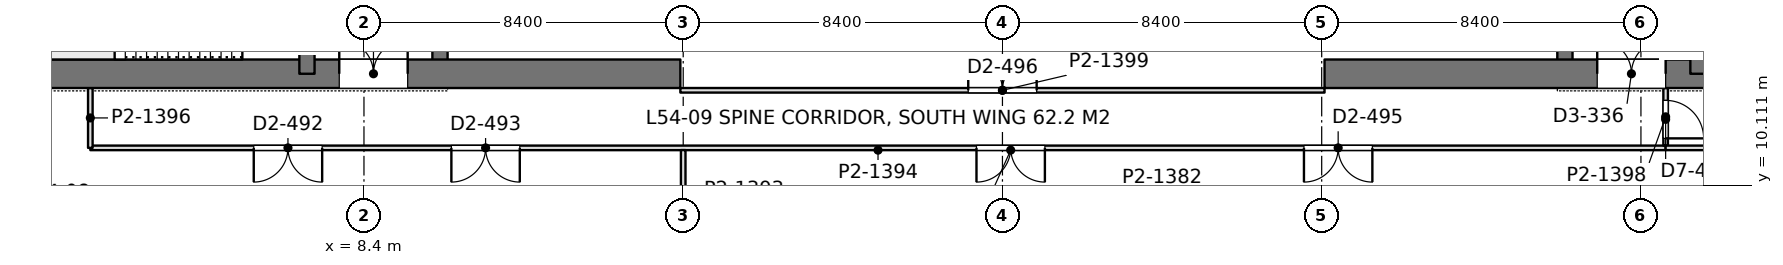
"""IFC4 building model, lengths in metres.
Left out: names, types, materials, properties, quantities, classifications, styles, units other than length and angle.
Written with IfcOpenShell. Run it as: python <this file> out.ifc"""

import sys

from ifc_helpers import new_model, si_unit, direction, frame, frame_2d, origin, place, context, subcontext, project, spatial, rectangle, extrude, element, fill, save


model = new_model("IFC4")
c1 = context("Model", 3, precision=1e-05, world=origin(), true_north=direction((0.0, 1.0)))
c2 = subcontext(c1, "Body", "Model", "MODEL_VIEW")
j1 = project(units=[si_unit("LENGTHUNIT", "METRE"), si_unit("PLANEANGLEUNIT", "RADIAN")], contexts=[c1])
p1 = place(None, origin())
s1 = spatial("IfcSite", under=j1, at=p1, CompositionType="ELEMENT")
p2 = place(p1, origin())
s2 = spatial("IfcBuilding", under=s1, at=p2, CompositionType="ELEMENT")
p3 = place(p2, frame((0.0, 0.0, 236.4)))
s3 = spatial("IfcBuildingStorey", under=s2, at=p3, CompositionType="ELEMENT", Elevation=236.4)
p4 = place(p3, frame((-1.125, 13.05, 0.0), z_axis=(0.0, 0.0, 1.0), x_axis=(1.0, 0.0, 0.0)))
e1 = element("IfcWall", 1, at=p4, inside=s3, PredefinedType="SHEAR", context=c2, shape_type="SweptSolid", body=[
    extrude(rectangle(XDim=17.85, YDim=0.75, at=frame_2d((8.925, 0.0))), origin(), (0.0, 0.0, 1.0), 4.2),
])
p5 = place(p4, frame((8.875, 0.0, 0.0)))
e2 = element("IfcOpeningElement", 2, at=p5, cuts=e1, PredefinedType="OPENING", context=c2, shape_type="SweptSolid", body=[
    extrude(rectangle(XDim=1.8, YDim=2.4, at=frame_2d((0.9, 1.2))), frame((0.0, 0.385, 0.0), z_axis=(0.0, -1.0, 0.0), x_axis=(1.0, 0.0, 0.0)), (0.0, 0.0, 1.0), 0.77),
])
p6 = place(p3, frame((6.9, 13.05, 0.0), z_axis=(0.0, 0.0, 1.0), x_axis=(0.0, 1.0, 0.0)))
e3 = element("IfcWall", 3, at=p6, inside=s3, PredefinedType="SHEAR", context=c2, shape_type="SweptSolid", body=[
    extrude(rectangle(XDim=24.3, YDim=0.4, at=frame_2d((12.15, 0.0))), origin(), (0.0, 0.0, 1.0), 4.2),
])
p7 = place(p6, frame((1.3, 0.0, 0.0)))
e4 = element("IfcOpeningElement", 4, at=p7, cuts=e3, PredefinedType="OPENING", context=c2, shape_type="SweptSolid", body=[
    extrude(rectangle(XDim=1.0, YDim=2.2, at=frame_2d((0.5, 1.1))), frame((0.0, 0.21, 0.0), z_axis=(0.0, -1.0, 0.0), x_axis=(1.0, 0.0, 0.0)), (0.0, 0.0, 1.0), 0.42),
])
p8 = place(p6, frame((22.0, 0.0, 0.0)))
e5 = element("IfcOpeningElement", 5, at=p8, cuts=e3, PredefinedType="OPENING", context=c2, shape_type="SweptSolid", body=[
    extrude(rectangle(XDim=1.0, YDim=2.2, at=frame_2d((0.5, 1.1))), frame((0.0, 0.21, 0.0), z_axis=(0.0, -1.0, 0.0), x_axis=(1.0, 0.0, 0.0)), (0.0, 0.0, 1.0), 0.42),
])
p9 = place(p6, frame((5.55, 0.0, 0.0)))
e6 = element("IfcOpeningElement", 6, at=p9, cuts=e3, PredefinedType="OPENING", context=c2, shape_type="SweptSolid", body=[
    extrude(rectangle(XDim=1.0, YDim=2.2, at=frame_2d((0.5, 1.1))), frame((0.0, 0.21, 0.0), z_axis=(0.0, -1.0, 0.0), x_axis=(1.0, 0.0, 0.0)), (0.0, 0.0, 1.0), 0.42),
])
p10 = place(p6, frame((9.55, 0.0, 0.0)))
e7 = element("IfcOpeningElement", 7, at=p10, cuts=e3, PredefinedType="OPENING", context=c2, shape_type="SweptSolid", body=[
    extrude(rectangle(XDim=1.0, YDim=2.2, at=frame_2d((0.5, 1.1))), frame((0.0, 0.21, 0.0), z_axis=(0.0, -1.0, 0.0), x_axis=(1.0, 0.0, 0.0)), (0.0, 0.0, 1.0), 0.42),
])
p11 = place(p6, frame((12.8, 0.0, 0.0)))
e8 = element("IfcOpeningElement", 8, at=p11, cuts=e3, PredefinedType="OPENING", context=c2, shape_type="SweptSolid", body=[
    extrude(rectangle(XDim=1.1, YDim=2.2, at=frame_2d((0.55, 1.1))), frame((0.0, 0.21, 0.0), z_axis=(0.0, -1.0, 0.0), x_axis=(1.0, 0.0, 0.0)), (0.0, 0.0, 1.0), 0.42),
])
p12 = place(p6, frame((15.538, 0.0, 0.0)))
e9 = element("IfcOpeningElement", 9, at=p12, cuts=e3, PredefinedType="OPENING", context=c2, shape_type="SweptSolid", body=[
    extrude(rectangle(XDim=1.1, YDim=2.2, at=frame_2d((0.55, 1.1))), frame((0.0, 0.21, 0.0), z_axis=(0.0, -1.0, 0.0), x_axis=(1.0, 0.0, 0.0)), (0.0, 0.0, 1.0), 0.42),
])
p13 = place(p6, frame((18.262, 0.0, 0.0)))
e10 = element("IfcOpeningElement", 10, at=p13, cuts=e3, PredefinedType="OPENING", context=c2, shape_type="SweptSolid", body=[
    extrude(rectangle(XDim=1.1, YDim=2.2, at=frame_2d((0.55, 1.1))), frame((0.0, 0.21, 0.0), z_axis=(0.0, -1.0, 0.0), x_axis=(1.0, 0.0, 0.0)), (0.0, 0.0, 1.0), 0.42),
])
p14 = place(p3, frame((10.4, 13.05, 0.0), z_axis=(0.0, 0.0, 1.0), x_axis=(0.0, 1.0, 0.0)))
e11 = element("IfcWall", 11, at=p14, inside=s3, PredefinedType="SHEAR", context=c2, shape_type="SweptSolid", body=[
    extrude(rectangle(XDim=24.3, YDim=0.4, at=frame_2d((12.15, 0.0))), origin(), (0.0, 0.0, 1.0), 4.2),
])
p15 = place(p14, frame((15.75, 0.0, 0.0)))
e12 = element("IfcOpeningElement", 12, at=p15, cuts=e11, PredefinedType="OPENING", context=c2, shape_type="SweptSolid", body=[
    extrude(rectangle(XDim=1.1, YDim=2.2, at=frame_2d((0.55, 1.1))), frame((0.0, 0.21, 0.0), z_axis=(0.0, -1.0, 0.0), x_axis=(1.0, 0.0, 0.0)), (0.0, 0.0, 1.0), 0.42),
])
p16 = place(p14, frame((18.6, 0.0, 0.0)))
e13 = element("IfcOpeningElement", 13, at=p16, cuts=e11, PredefinedType="OPENING", context=c2, shape_type="SweptSolid", body=[
    extrude(rectangle(XDim=1.1, YDim=2.2, at=frame_2d((0.55, 1.1))), frame((0.0, 0.21, 0.0), z_axis=(0.0, -1.0, 0.0), x_axis=(1.0, 0.0, 0.0)), (0.0, 0.0, 1.0), 0.42),
])
p17 = place(p14, frame((21.45, 0.0, 0.0)))
e14 = element("IfcOpeningElement", 14, at=p17, cuts=e11, PredefinedType="OPENING", context=c2, shape_type="SweptSolid", body=[
    extrude(rectangle(XDim=1.1, YDim=2.2, at=frame_2d((0.55, 1.1))), frame((0.0, 0.21, 0.0), z_axis=(0.0, -1.0, 0.0), x_axis=(1.0, 0.0, 0.0)), (0.0, 0.0, 1.0), 0.42),
])
p18 = place(p14, frame((6.05, 0.0, 0.0)))
e15 = element("IfcOpeningElement", 15, at=p18, cuts=e11, PredefinedType="OPENING", context=c2, shape_type="SweptSolid", body=[
    extrude(rectangle(XDim=1.8, YDim=2.4, at=frame_2d((0.9, 1.2))), frame((0.0, 0.21, 0.0), z_axis=(0.0, -1.0, 0.0), x_axis=(1.0, 0.0, 0.0)), (0.0, 0.0, 1.0), 0.42),
])
p19 = place(p14, frame((11.25, 0.0, 0.0)))
e16 = element("IfcOpeningElement", 16, at=p19, cuts=e11, PredefinedType="OPENING", context=c2, shape_type="SweptSolid", body=[
    extrude(rectangle(XDim=1.8, YDim=2.4, at=frame_2d((0.9, 1.2))), frame((0.0, 0.21, 0.0), z_axis=(0.0, -1.0, 0.0), x_axis=(1.0, 0.0, 0.0)), (0.0, 0.0, 1.0), 0.42),
])
p20 = place(p3, frame((33.675, 13.05, 0.0), z_axis=(0.0, 0.0, 1.0), x_axis=(1.0, 0.0, 0.0)))
e17 = element("IfcWall", 17, at=p20, inside=s3, PredefinedType="SHEAR", context=c2, shape_type="SweptSolid", body=[
    extrude(rectangle(XDim=17.85, YDim=0.75, at=frame_2d((8.925, 0.0))), origin(), (0.0, 0.0, 1.0), 4.2),
])
p21 = place(p20, frame((7.175, 0.0, 0.0)))
e18 = element("IfcOpeningElement", 18, at=p21, cuts=e17, PredefinedType="OPENING", context=c2, shape_type="SweptSolid", body=[
    extrude(rectangle(XDim=1.8, YDim=2.4, at=frame_2d((0.9, 1.2))), frame((0.0, 0.385, 0.0), z_axis=(0.0, -1.0, 0.0), x_axis=(1.0, 0.0, 0.0)), (0.0, 0.0, 1.0), 0.77),
])
p22 = place(p3, frame((43.5, 13.05, 0.0), z_axis=(0.0, 0.0, 1.0), x_axis=(0.0, 1.0, 0.0)))
e19 = element("IfcWall", 19, at=p22, inside=s3, PredefinedType="SHEAR", context=c2, shape_type="SweptSolid", body=[
    extrude(rectangle(XDim=24.3, YDim=0.4, at=frame_2d((12.15, 0.0))), origin(), (0.0, 0.0, 1.0), 4.2),
])
p23 = place(p22, frame((1.3, 0.0, 0.0)))
e20 = element("IfcOpeningElement", 20, at=p23, cuts=e19, PredefinedType="OPENING", context=c2, shape_type="SweptSolid", body=[
    extrude(rectangle(XDim=1.0, YDim=2.2, at=frame_2d((0.5, 1.1))), frame((0.0, 0.21, 0.0), z_axis=(0.0, -1.0, 0.0), x_axis=(1.0, 0.0, 0.0)), (0.0, 0.0, 1.0), 0.42),
])
p24 = place(p22, frame((22.0, 0.0, 0.0)))
e21 = element("IfcOpeningElement", 21, at=p24, cuts=e19, PredefinedType="OPENING", context=c2, shape_type="SweptSolid", body=[
    extrude(rectangle(XDim=1.0, YDim=2.2, at=frame_2d((0.5, 1.1))), frame((0.0, 0.21, 0.0), z_axis=(0.0, -1.0, 0.0), x_axis=(1.0, 0.0, 0.0)), (0.0, 0.0, 1.0), 0.42),
])
p25 = place(p22, frame((5.55, 0.0, 0.0)))
e22 = element("IfcOpeningElement", 22, at=p25, cuts=e19, PredefinedType="OPENING", context=c2, shape_type="SweptSolid", body=[
    extrude(rectangle(XDim=1.0, YDim=2.2, at=frame_2d((0.5, 1.1))), frame((0.0, 0.21, 0.0), z_axis=(0.0, -1.0, 0.0), x_axis=(1.0, 0.0, 0.0)), (0.0, 0.0, 1.0), 0.42),
])
p26 = place(p22, frame((9.55, 0.0, 0.0)))
e23 = element("IfcOpeningElement", 23, at=p26, cuts=e19, PredefinedType="OPENING", context=c2, shape_type="SweptSolid", body=[
    extrude(rectangle(XDim=1.0, YDim=2.2, at=frame_2d((0.5, 1.1))), frame((0.0, 0.21, 0.0), z_axis=(0.0, -1.0, 0.0), x_axis=(1.0, 0.0, 0.0)), (0.0, 0.0, 1.0), 0.42),
])
p27 = place(p22, frame((12.8, 0.0, 0.0)))
e24 = element("IfcOpeningElement", 24, at=p27, cuts=e19, PredefinedType="OPENING", context=c2, shape_type="SweptSolid", body=[
    extrude(rectangle(XDim=1.1, YDim=2.2, at=frame_2d((0.55, 1.1))), frame((0.0, 0.21, 0.0), z_axis=(0.0, -1.0, 0.0), x_axis=(1.0, 0.0, 0.0)), (0.0, 0.0, 1.0), 0.42),
])
p28 = place(p22, frame((15.538, 0.0, 0.0)))
e25 = element("IfcOpeningElement", 25, at=p28, cuts=e19, PredefinedType="OPENING", context=c2, shape_type="SweptSolid", body=[
    extrude(rectangle(XDim=1.1, YDim=2.2, at=frame_2d((0.55, 1.1))), frame((0.0, 0.21, 0.0), z_axis=(0.0, -1.0, 0.0), x_axis=(1.0, 0.0, 0.0)), (0.0, 0.0, 1.0), 0.42),
])
p29 = place(p22, frame((18.262, 0.0, 0.0)))
e26 = element("IfcOpeningElement", 26, at=p29, cuts=e19, PredefinedType="OPENING", context=c2, shape_type="SweptSolid", body=[
    extrude(rectangle(XDim=1.1, YDim=2.2, at=frame_2d((0.55, 1.1))), frame((0.0, 0.21, 0.0), z_axis=(0.0, -1.0, 0.0), x_axis=(1.0, 0.0, 0.0)), (0.0, 0.0, 1.0), 0.42),
])
p30 = place(p3, frame((40.0, 13.05, 0.0), z_axis=(0.0, 0.0, 1.0), x_axis=(0.0, 1.0, 0.0)))
e27 = element("IfcWall", 27, at=p30, inside=s3, PredefinedType="SHEAR", context=c2, shape_type="SweptSolid", body=[
    extrude(rectangle(XDim=24.3, YDim=0.4, at=frame_2d((12.15, 0.0))), origin(), (0.0, 0.0, 1.0), 4.2),
])
p31 = place(p30, frame((15.75, 0.0, 0.0)))
e28 = element("IfcOpeningElement", 28, at=p31, cuts=e27, PredefinedType="OPENING", context=c2, shape_type="SweptSolid", body=[
    extrude(rectangle(XDim=1.1, YDim=2.2, at=frame_2d((0.55, 1.1))), frame((0.0, 0.21, 0.0), z_axis=(0.0, -1.0, 0.0), x_axis=(1.0, 0.0, 0.0)), (0.0, 0.0, 1.0), 0.42),
])
p32 = place(p30, frame((18.6, 0.0, 0.0)))
e29 = element("IfcOpeningElement", 29, at=p32, cuts=e27, PredefinedType="OPENING", context=c2, shape_type="SweptSolid", body=[
    extrude(rectangle(XDim=1.1, YDim=2.2, at=frame_2d((0.55, 1.1))), frame((0.0, 0.21, 0.0), z_axis=(0.0, -1.0, 0.0), x_axis=(1.0, 0.0, 0.0)), (0.0, 0.0, 1.0), 0.42),
])
p33 = place(p30, frame((21.45, 0.0, 0.0)))
e30 = element("IfcOpeningElement", 30, at=p33, cuts=e27, PredefinedType="OPENING", context=c2, shape_type="SweptSolid", body=[
    extrude(rectangle(XDim=1.1, YDim=2.2, at=frame_2d((0.55, 1.1))), frame((0.0, 0.21, 0.0), z_axis=(0.0, -1.0, 0.0), x_axis=(1.0, 0.0, 0.0)), (0.0, 0.0, 1.0), 0.42),
])
p34 = place(p30, frame((6.05, 0.0, 0.0)))
e31 = element("IfcOpeningElement", 31, at=p34, cuts=e27, PredefinedType="OPENING", context=c2, shape_type="SweptSolid", body=[
    extrude(rectangle(XDim=1.8, YDim=2.4, at=frame_2d((0.9, 1.2))), frame((0.0, 0.21, 0.0), z_axis=(0.0, -1.0, 0.0), x_axis=(1.0, 0.0, 0.0)), (0.0, 0.0, 1.0), 0.42),
])
p35 = place(p30, frame((11.25, 0.0, 0.0)))
e32 = element("IfcOpeningElement", 32, at=p35, cuts=e27, PredefinedType="OPENING", context=c2, shape_type="SweptSolid", body=[
    extrude(rectangle(XDim=1.8, YDim=2.4, at=frame_2d((0.9, 1.2))), frame((0.0, 0.21, 0.0), z_axis=(0.0, -1.0, 0.0), x_axis=(1.0, 0.0, 0.0)), (0.0, 0.0, 1.0), 0.42),
])
p36 = place(p3, frame((16.8, 8.949, 0.0), z_axis=(0.0, 0.0, 1.0), x_axis=(0.0, 1.0, 0.0)))
e33 = element("IfcWall", 33, at=p36, inside=s3, PredefinedType="PARTITIONING", context=c2, shape_type="SweptSolid", body=[
    extrude(rectangle(XDim=2.093, YDim=0.12, at=frame_2d((1.046, 0.0))), origin(), (0.0, 0.0, 1.0), 3.69),
])
p37 = place(p3, frame((1.2, 11.1, 0.0), z_axis=(0.0, 0.0, 1.0), x_axis=(1.0, 0.0, 0.0)))
e34 = element("IfcWall", 34, at=p37, inside=s3, PredefinedType="PARTITIONING", context=c2, shape_type="SweptSolid", body=[
    extrude(rectangle(XDim=41.452, YDim=0.12, at=frame_2d((20.726, 0.0))), origin(), (0.0, 0.0, 1.0), 3.55),
])
p38 = place(p37, frame((4.3, 0.0, 0.0)))
e35 = element("IfcOpeningElement", 35, at=p38, cuts=e34, PredefinedType="OPENING", context=c2, shape_type="SweptSolid", body=[
    extrude(rectangle(XDim=1.8, YDim=2.2, at=frame_2d((0.9, 1.1))), frame((0.0, 0.07, 0.0), z_axis=(0.0, -1.0, 0.0), x_axis=(1.0, 0.0, 0.0)), (0.0, 0.0, 1.0), 0.14),
])
p39 = place(p37, frame((9.5, 0.0, 0.0)))
e36 = element("IfcOpeningElement", 36, at=p39, cuts=e34, PredefinedType="OPENING", context=c2, shape_type="SweptSolid", body=[
    extrude(rectangle(XDim=1.8, YDim=2.2, at=frame_2d((0.9, 1.1))), frame((0.0, 0.07, 0.0), z_axis=(0.0, -1.0, 0.0), x_axis=(1.0, 0.0, 0.0)), (0.0, 0.0, 1.0), 0.14),
])
p40 = place(p37, frame((23.317, 0.0, 0.0)))
e37 = element("IfcOpeningElement", 37, at=p40, cuts=e34, PredefinedType="OPENING", context=c2, shape_type="SweptSolid", body=[
    extrude(rectangle(XDim=1.8, YDim=2.2, at=frame_2d((0.9, 1.1))), frame((0.0, 0.07, 0.0), z_axis=(0.0, -1.0, 0.0), x_axis=(1.0, 0.0, 0.0)), (0.0, 0.0, 1.0), 0.14),
])
p41 = place(p37, frame((31.933, 0.0, 0.0)))
e38 = element("IfcOpeningElement", 38, at=p41, cuts=e34, PredefinedType="OPENING", context=c2, shape_type="SweptSolid", body=[
    extrude(rectangle(XDim=1.8, YDim=2.2, at=frame_2d((0.9, 1.1))), frame((0.0, 0.07, 0.0), z_axis=(0.0, -1.0, 0.0), x_axis=(1.0, 0.0, 0.0)), (0.0, 0.0, 1.0), 0.14),
])
p42 = place(p3, frame((1.2, 11.1, 0.0), z_axis=(0.0, 0.0, 1.0), x_axis=(0.0, 1.0, 0.0)))
e39 = element("IfcWall", 39, at=p42, inside=s3, PredefinedType="PARTITIONING", context=c2, shape_type="SweptSolid", body=[
    extrude(rectangle(XDim=1.576, YDim=0.12, at=frame_2d((0.788, 0.0))), origin(), (0.0, 0.0, 1.0), 4.05),
])
p43 = place(p3, frame((42.65, 11.158, 0.0), z_axis=(0.0, 0.0, 1.0), x_axis=(0.0, 1.0, 0.0)))
e40 = element("IfcWall", 40, at=p43, inside=s3, PredefinedType="PARTITIONING", context=c2, shape_type="SweptSolid", body=[
    extrude(rectangle(XDim=1.518, YDim=0.12, at=frame_2d((0.759, 0.0))), origin(), (0.0, 0.0, 1.0), 4.05),
])
p44 = place(p43, frame((0.192, 0.0, 0.0)))
e41 = element("IfcOpeningElement", 41, at=p44, cuts=e40, PredefinedType="OPENING", context=c2, shape_type="SweptSolid", body=[
    extrude(rectangle(XDim=1.0, YDim=2.4, at=frame_2d((0.5, 1.2))), frame((0.0, 0.07, 0.0), z_axis=(0.0, -1.0, 0.0), x_axis=(1.0, 0.0, 0.0)), (0.0, 0.0, 1.0), 0.14),
])
p45 = place(p3, frame((42.648, 11.1, 0.0), z_axis=(0.0, 0.0, 1.0), x_axis=(1.0, 0.0, 0.0)))
e42 = element("IfcWall", 42, at=p45, inside=s3, PredefinedType="PARTITIONING", context=c2, shape_type="SweptSolid", body=[
    extrude(rectangle(XDim=6.552, YDim=0.12, at=frame_2d((3.276, 0.0))), origin(), (0.0, 0.0, 1.0), 4.05),
])
p46 = place(p3, frame((16.725, 12.615, 0.0), z_axis=(0.0, 0.0, 1.0), x_axis=(1.0, 0.0, 0.0)))
e43 = element("IfcWall", 43, at=p46, inside=s3, PredefinedType="PARTITIONING", context=c2, shape_type="SweptSolid", body=[
    extrude(rectangle(XDim=16.95, YDim=0.12, at=frame_2d((8.475, 0.0))), origin(), (0.0, 0.0, 1.0), 3.55),
])
p47 = place(p46, frame((7.575, 0.0, 0.0)))
e44 = element("IfcOpeningElement", 44, at=p47, cuts=e43, PredefinedType="OPENING", context=c2, shape_type="SweptSolid", body=[
    extrude(rectangle(XDim=1.8, YDim=2.2, at=frame_2d((0.9, 1.1))), frame((0.0, 0.07, 0.0), z_axis=(0.0, -1.0, 0.0), x_axis=(1.0, 0.0, 0.0)), (0.0, 0.0, 1.0), 0.14),
])
p48 = place(p5, origin())
e45 = element("IfcDoor", 45, at=p48, inside=s3, OperationType="DOUBLE_DOOR_SINGLE_SWING", PredefinedType="DOOR", context=c2, shape_type="SweptSolid", body=[
    extrude(rectangle(XDim=1.8, YDim=2.4, at=frame_2d((0.9, 1.2))), frame((0.0, 0.025, 0.0), z_axis=(0.0, -1.0, 0.0), x_axis=(1.0, 0.0, 0.0)), (0.0, 0.0, 1.0), 0.05),
])
fill(e2, e45)
p49 = place(p21, origin())
e46 = element("IfcDoor", 46, at=p49, inside=s3, OperationType="DOUBLE_DOOR_SINGLE_SWING", PredefinedType="DOOR", context=c2, shape_type="SweptSolid", body=[
    extrude(rectangle(XDim=1.8, YDim=2.4, at=frame_2d((0.9, 1.2))), frame((0.0, 0.025, 0.0), z_axis=(0.0, -1.0, 0.0), x_axis=(1.0, 0.0, 0.0)), (0.0, 0.0, 1.0), 0.05),
])
fill(e18, e46)
p50 = place(p38, frame((1.8, 0.0, 0.0), z_axis=(0.0, 0.0, 1.0), x_axis=(-1.0, 0.0, 0.0)))
e47 = element("IfcDoor", 47, at=p50, inside=s3, OperationType="DOUBLE_DOOR_SINGLE_SWING", PredefinedType="DOOR", context=c2, shape_type="SweptSolid", body=[
    extrude(rectangle(XDim=1.8, YDim=2.2, at=frame_2d((0.9, 1.1))), frame((0.0, 0.025, 0.0), z_axis=(0.0, -1.0, 0.0), x_axis=(1.0, 0.0, 0.0)), (0.0, 0.0, 1.0), 0.05),
])
fill(e35, e47)
p51 = place(p39, frame((1.8, 0.0, 0.0), z_axis=(0.0, 0.0, 1.0), x_axis=(-1.0, 0.0, 0.0)))
e48 = element("IfcDoor", 48, at=p51, inside=s3, OperationType="DOUBLE_DOOR_SINGLE_SWING", PredefinedType="DOOR", context=c2, shape_type="SweptSolid", body=[
    extrude(rectangle(XDim=1.8, YDim=2.2, at=frame_2d((0.9, 1.1))), frame((0.0, 0.025, 0.0), z_axis=(0.0, -1.0, 0.0), x_axis=(1.0, 0.0, 0.0)), (0.0, 0.0, 1.0), 0.05),
])
fill(e36, e48)
p52 = place(p40, frame((1.8, 0.0, 0.0), z_axis=(0.0, 0.0, 1.0), x_axis=(-1.0, 0.0, 0.0)))
e49 = element("IfcDoor", 49, at=p52, inside=s3, OperationType="DOUBLE_DOOR_SINGLE_SWING", PredefinedType="DOOR", context=c2, shape_type="SweptSolid", body=[
    extrude(rectangle(XDim=1.8, YDim=2.2, at=frame_2d((0.9, 1.1))), frame((0.0, 0.025, 0.0), z_axis=(0.0, -1.0, 0.0), x_axis=(1.0, 0.0, 0.0)), (0.0, 0.0, 1.0), 0.05),
])
fill(e37, e49)
p53 = place(p41, frame((1.8, 0.0, 0.0), z_axis=(0.0, 0.0, 1.0), x_axis=(-1.0, 0.0, 0.0)))
e50 = element("IfcDoor", 50, at=p53, inside=s3, OperationType="DOUBLE_DOOR_SINGLE_SWING", PredefinedType="DOOR", context=c2, shape_type="SweptSolid", body=[
    extrude(rectangle(XDim=1.8, YDim=2.2, at=frame_2d((0.9, 1.1))), frame((0.0, 0.025, 0.0), z_axis=(0.0, -1.0, 0.0), x_axis=(1.0, 0.0, 0.0)), (0.0, 0.0, 1.0), 0.05),
])
fill(e38, e50)
p54 = place(p44, frame((1.0, 0.0, 0.0), z_axis=(0.0, 0.0, 1.0), x_axis=(-1.0, 0.0, 0.0)))
e51 = element("IfcDoor", 51, at=p54, inside=s3, OperationType="SINGLE_SWING_RIGHT", PredefinedType="DOOR", context=c2, shape_type="SweptSolid", body=[
    extrude(rectangle(XDim=1.0, YDim=2.4, at=frame_2d((0.5, 1.2))), frame((0.0, 0.025, 0.0), z_axis=(0.0, -1.0, 0.0), x_axis=(1.0, 0.0, 0.0)), (0.0, 0.0, 1.0), 0.05),
])
fill(e41, e51)
p55 = place(p47, origin())
e52 = element("IfcDoor", 52, at=p55, inside=s3, OperationType="DOUBLE_DOOR_SINGLE_SWING", PredefinedType="DOOR", context=c2, shape_type="SweptSolid", body=[
    extrude(rectangle(XDim=1.8, YDim=2.2, at=frame_2d((0.9, 1.1))), frame((0.0, 0.025, 0.0), z_axis=(0.0, -1.0, 0.0), x_axis=(1.0, 0.0, 0.0)), (0.0, 0.0, 1.0), 0.05),
])
fill(e44, e52)
save(model, sys.argv[1])
